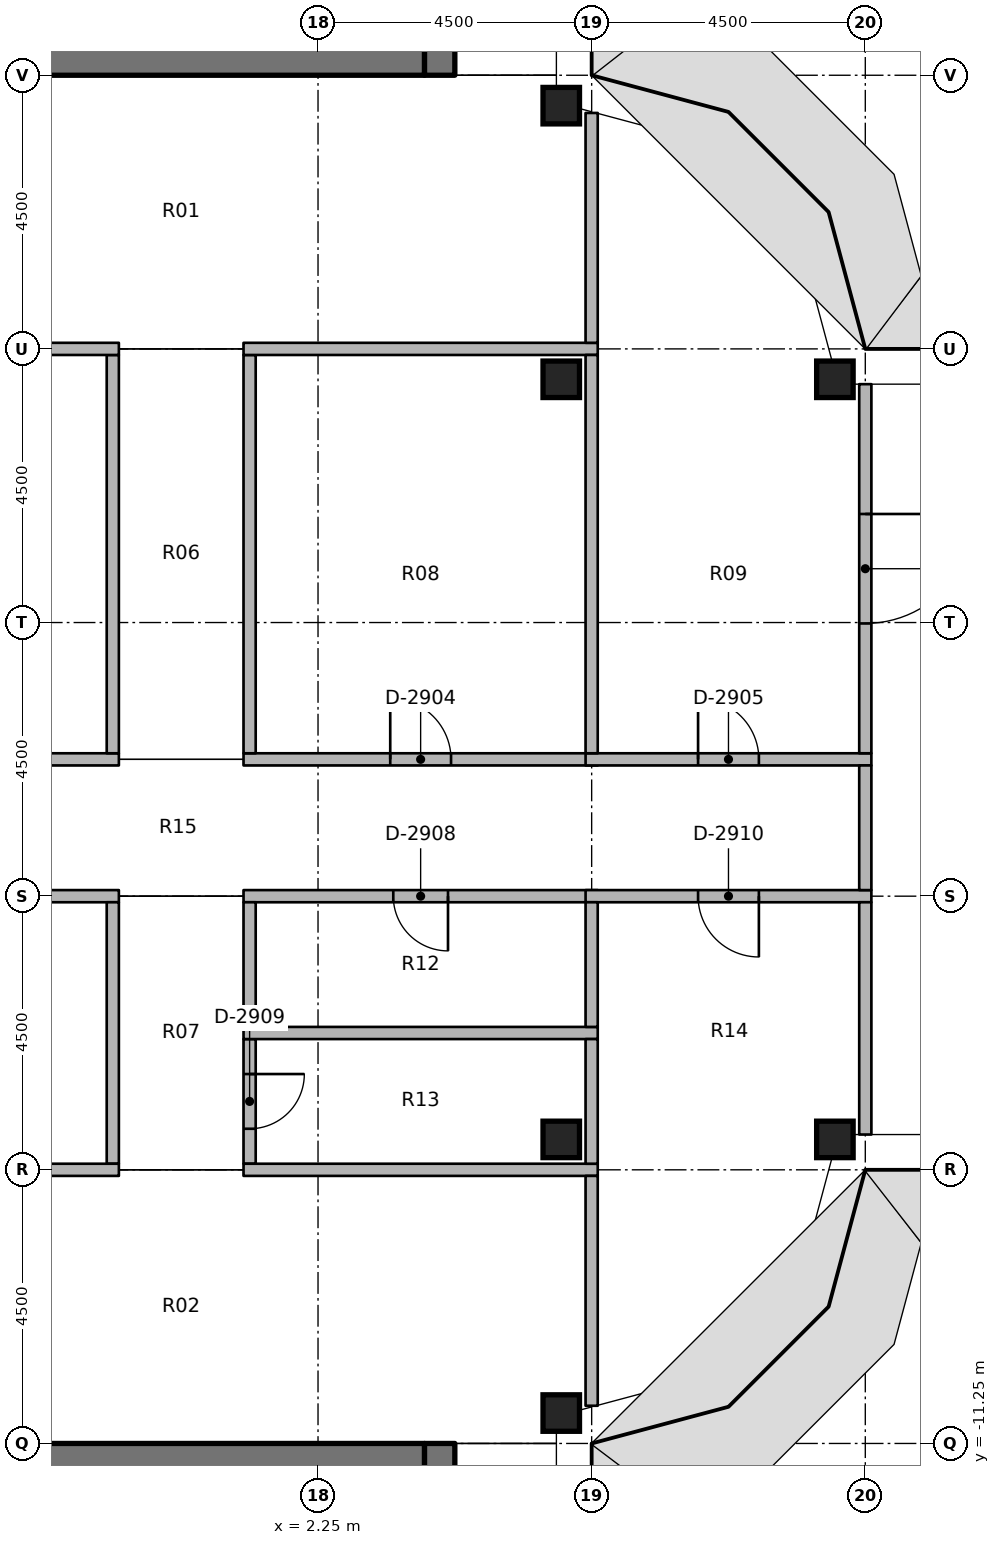
"""IFC4 building model, lengths in metres.
Left out: names, types, materials, properties, quantities, classifications, styles, units other than length and angle.
Written with IfcOpenShell. Run it as: python <this file> out.ifc"""

import sys

from ifc_helpers import new_model, si_unit, direction, frame, frame_2d, origin, origin_2d, place, context, subcontext, project, spatial, rectangle, extrude, element, fill, save


model = new_model("IFC4")
c1 = context("Model", 3, precision=1e-05, world=origin(), true_north=direction((0.0, 1.0)))
c2 = subcontext(c1, "Body", "Model", "MODEL_VIEW")
j1 = project(units=[si_unit("LENGTHUNIT", "METRE"), si_unit("PLANEANGLEUNIT", "RADIAN")], contexts=[c1])
p1 = place(None, origin())
s1 = spatial("IfcSite", under=j1, at=p1, CompositionType="ELEMENT")
p2 = place(p1, origin())
s2 = spatial("IfcBuilding", under=s1, at=p2, CompositionType="ELEMENT")
p3 = place(p2, frame((0.0, 0.0, 276.4)))
s3 = spatial("IfcBuildingStorey", under=s2, at=p3, CompositionType="ELEMENT", Elevation=276.4)
for number, where, z_axis, x_axis in (
    (1, (6.25, -10.75, 0.0), (0.0, 0.0, 1.0), (1.0, 0.0, 0.0)),
    (2, (6.25, -6.25, 0.0), (0.0, 0.0, 1.0), (1.0, 0.0, 0.0)),
    (3, (6.25, 6.25, 0.0), (0.0, 0.0, 1.0), (1.0, 0.0, 0.0)),
    (4, (6.25, 10.75, 0.0), (0.0, 0.0, 1.0), (1.0, 0.0, 0.0)),
    (5, (10.75, -6.25, 0.0), (0.0, 0.0, 1.0), (1.0, 0.0, 0.0)),
    (6, (10.75, 6.25, 0.0), (0.0, 0.0, 1.0), (1.0, 0.0, 0.0)),
):
    element("IfcColumn", number, at=place(p3, frame(where, z_axis=z_axis, x_axis=x_axis)), inside=s3, PredefinedType="COLUMN", context=c2, shape_type="SweptSolid", body=[
        extrude(rectangle(XDim=0.6, YDim=0.6, at=origin_2d()), origin(), (0.0, 0.0, 1.0), 3.65),
    ])
p4 = place(p3, frame((4.25, 11.25, 0.0), z_axis=(0.0, 0.0, 1.0), x_axis=(0.0, 1.0, 0.0)))
e7 = element("IfcWall", 7, at=p4, inside=s3, PredefinedType="SHEAR", context=c2, shape_type="SweptSolid", body=[
    extrude(rectangle(XDim=15.0, YDim=0.5, at=frame_2d((7.5, 0.0))), origin(), (0.0, 0.0, 1.0), 3.8),
])
p5 = place(p4, frame((7.15, 0.0, 0.0)))
e8 = element("IfcOpeningElement", 8, at=p5, cuts=e7, PredefinedType="OPENING", context=c2, shape_type="SweptSolid", body=[
    extrude(rectangle(XDim=1.5, YDim=2.3, at=frame_2d((0.75, 1.15))), frame((0.0, 0.26, 0.0), z_axis=(0.0, -1.0, 0.0), x_axis=(1.0, 0.0, 0.0)), (0.0, 0.0, 1.0), 0.52),
])
p6 = place(p4, frame((5.55, 0.0, 0.0)))
e9 = element("IfcOpeningElement", 9, at=p6, cuts=e7, PredefinedType="OPENING", context=c2, shape_type="SweptSolid", body=[
    extrude(rectangle(XDim=1.2, YDim=2.1, at=frame_2d((0.6, 1.05))), frame((0.0, 0.26, 0.0), z_axis=(0.0, -1.0, 0.0), x_axis=(1.0, 0.0, 0.0)), (0.0, 0.0, 1.0), 0.52),
])
p7 = place(p3, frame((-4.0, 11.5, 0.0), z_axis=(0.0, 0.0, 1.0), x_axis=(1.0, 0.0, 0.0)))
e10 = element("IfcWall", 10, at=p7, inside=s3, PredefinedType="SHEAR", context=c2, shape_type="SweptSolid", body=[
    extrude(rectangle(XDim=8.0, YDim=0.5, at=frame_2d((4.0, 0.0))), origin(), (0.0, 0.0, 1.0), 3.8),
])
p8 = place(p3, frame((4.25, -11.25, 0.0), z_axis=(0.0, 0.0, 1.0), x_axis=(0.0, -1.0, 0.0)))
e11 = element("IfcWall", 11, at=p8, inside=s3, PredefinedType="SHEAR", context=c2, shape_type="SweptSolid", body=[
    extrude(rectangle(XDim=15.0, YDim=0.5, at=frame_2d((7.5, 0.0))), origin(), (0.0, 0.0, 1.0), 3.8),
])
p9 = place(p8, frame((7.15, 0.0, 0.0)))
e12 = element("IfcOpeningElement", 12, at=p9, cuts=e11, PredefinedType="OPENING", context=c2, shape_type="SweptSolid", body=[
    extrude(rectangle(XDim=1.5, YDim=2.3, at=frame_2d((0.75, 1.15))), frame((0.0, 0.26, 0.0), z_axis=(0.0, -1.0, 0.0), x_axis=(1.0, 0.0, 0.0)), (0.0, 0.0, 1.0), 0.52),
])
p10 = place(p8, frame((13.9, 0.0, 0.0)))
e13 = element("IfcOpeningElement", 13, at=p10, cuts=e11, PredefinedType="OPENING", context=c2, shape_type="SweptSolid", body=[
    extrude(rectangle(XDim=0.9, YDim=2.1, at=frame_2d((0.45, 1.05))), frame((0.0, 0.26, 0.0), z_axis=(0.0, -1.0, 0.0), x_axis=(1.0, 0.0, 0.0)), (0.0, 0.0, 1.0), 0.52),
])
p11 = place(p8, frame((1.15, 0.0, 0.0)))
e14 = element("IfcOpeningElement", 14, at=p11, cuts=e11, PredefinedType="OPENING", context=c2, shape_type="SweptSolid", body=[
    extrude(rectangle(XDim=1.2, YDim=2.1, at=frame_2d((0.6, 1.05))), frame((0.0, 0.26, 0.0), z_axis=(0.0, -1.0, 0.0), x_axis=(1.0, 0.0, 0.0)), (0.0, 0.0, 1.0), 0.52),
])
p12 = place(p3, frame((-4.0, -11.5, 0.0), z_axis=(0.0, 0.0, 1.0), x_axis=(1.0, 0.0, 0.0)))
e15 = element("IfcWall", 15, at=p12, inside=s3, PredefinedType="SHEAR", context=c2, shape_type="SweptSolid", body=[
    extrude(rectangle(XDim=8.0, YDim=0.5, at=frame_2d((4.0, 0.0))), origin(), (0.0, 0.0, 1.0), 3.8),
])
p13 = place(p3, frame((1.025, 0.0, 0.0), z_axis=(0.0, 0.0, 1.0), x_axis=(1.0, 0.0, 0.0)))
e16 = element("IfcWall", 16, at=p13, inside=s3, PredefinedType="PARTITIONING", context=c2, shape_type="SweptSolid", body=[
    extrude(rectangle(XDim=5.825, YDim=0.2, at=frame_2d((2.913, 0.0))), origin(), (0.0, 0.0, 1.0), 2.75),
])
p14 = place(p13, frame((2.413, 0.0, 0.0)))
e17 = element("IfcOpeningElement", 17, at=p14, cuts=e16, PredefinedType="OPENING", context=c2, shape_type="SweptSolid", body=[
    extrude(rectangle(XDim=1.0, YDim=2.1, at=frame_2d((0.5, 1.05))), frame((0.0, 0.11, 0.0), z_axis=(0.0, -1.0, 0.0), x_axis=(1.0, 0.0, 0.0)), (0.0, 0.0, 1.0), 0.22),
])
p15 = place(p3, frame((6.65, 0.0, 0.0), z_axis=(0.0, 0.0, 1.0), x_axis=(1.0, 0.0, 0.0)))
e18 = element("IfcWall", 18, at=p15, inside=s3, PredefinedType="PARTITIONING", context=c2, shape_type="SweptSolid", body=[
    extrude(rectangle(XDim=4.7, YDim=0.2, at=frame_2d((2.35, 0.0))), origin(), (0.0, 0.0, 1.0), 2.75),
])
p16 = place(p15, frame((1.85, 0.0, 0.0)))
e19 = element("IfcOpeningElement", 19, at=p16, cuts=e18, PredefinedType="OPENING", context=c2, shape_type="SweptSolid", body=[
    extrude(rectangle(XDim=1.0, YDim=2.1, at=frame_2d((0.5, 1.05))), frame((0.0, 0.11, 0.0), z_axis=(0.0, -1.0, 0.0), x_axis=(1.0, 0.0, 0.0)), (0.0, 0.0, 1.0), 0.22),
])
p17 = place(p3, frame((-6.85, 0.0, 0.0), z_axis=(0.0, 0.0, 1.0), x_axis=(1.0, 0.0, 0.0)))
e20 = element("IfcWall", 20, at=p17, inside=s3, PredefinedType="PARTITIONING", context=c2, shape_type="SweptSolid", body=[
    extrude(rectangle(XDim=5.825, YDim=0.2, at=frame_2d((2.913, 0.0))), origin(), (0.0, 0.0, 1.0), 2.75),
])
p18 = place(p17, frame((2.413, 0.0, 0.0)))
e21 = element("IfcOpeningElement", 21, at=p18, cuts=e20, PredefinedType="OPENING", context=c2, shape_type="SweptSolid", body=[
    extrude(rectangle(XDim=1.0, YDim=2.1, at=frame_2d((0.5, 1.05))), frame((0.0, 0.11, 0.0), z_axis=(0.0, -1.0, 0.0), x_axis=(1.0, 0.0, 0.0)), (0.0, 0.0, 1.0), 0.22),
])
p19 = place(p3, frame((6.85, -2.25, 0.0), z_axis=(0.0, 0.0, 1.0), x_axis=(-1.0, 0.0, 0.0)))
e22 = element("IfcWall", 22, at=p19, inside=s3, PredefinedType="PARTITIONING", context=c2, shape_type="SweptSolid", body=[
    extrude(rectangle(XDim=5.825, YDim=0.2, at=frame_2d((2.913, 0.0))), origin(), (0.0, 0.0, 1.0), 2.75),
])
p20 = place(p19, frame((2.462, 0.0, 0.0)))
e23 = element("IfcOpeningElement", 23, at=p20, cuts=e22, PredefinedType="OPENING", context=c2, shape_type="SweptSolid", body=[
    extrude(rectangle(XDim=0.9, YDim=2.1, at=frame_2d((0.45, 1.05))), frame((0.0, 0.11, 0.0), z_axis=(0.0, -1.0, 0.0), x_axis=(1.0, 0.0, 0.0)), (0.0, 0.0, 1.0), 0.22),
])
p21 = place(p3, frame((11.35, -2.25, 0.0), z_axis=(0.0, 0.0, 1.0), x_axis=(-1.0, 0.0, 0.0)))
e24 = element("IfcWall", 24, at=p21, inside=s3, PredefinedType="PARTITIONING", context=c2, shape_type="SweptSolid", body=[
    extrude(rectangle(XDim=4.7, YDim=0.2, at=frame_2d((2.35, 0.0))), origin(), (0.0, 0.0, 1.0), 2.75),
])
p22 = place(p21, frame((1.85, 0.0, 0.0)))
e25 = element("IfcOpeningElement", 25, at=p22, cuts=e24, PredefinedType="OPENING", context=c2, shape_type="SweptSolid", body=[
    extrude(rectangle(XDim=1.0, YDim=2.1, at=frame_2d((0.5, 1.05))), frame((0.0, 0.11, 0.0), z_axis=(0.0, -1.0, 0.0), x_axis=(1.0, 0.0, 0.0)), (0.0, 0.0, 1.0), 0.22),
])
p23 = place(p3, frame((-1.025, -2.25, 0.0), z_axis=(0.0, 0.0, 1.0), x_axis=(-1.0, 0.0, 0.0)))
e26 = element("IfcWall", 26, at=p23, inside=s3, PredefinedType="PARTITIONING", context=c2, shape_type="SweptSolid", body=[
    extrude(rectangle(XDim=5.825, YDim=0.2, at=frame_2d((2.913, 0.0))), origin(), (0.0, 0.0, 1.0), 2.75),
])
p24 = place(p23, frame((2.413, 0.0, 0.0)))
e27 = element("IfcOpeningElement", 27, at=p24, cuts=e26, PredefinedType="OPENING", context=c2, shape_type="SweptSolid", body=[
    extrude(rectangle(XDim=1.0, YDim=2.1, at=frame_2d((0.5, 1.05))), frame((0.0, 0.11, 0.0), z_axis=(0.0, -1.0, 0.0), x_axis=(1.0, 0.0, 0.0)), (0.0, 0.0, 1.0), 0.22),
])
p25 = place(p3, frame((11.25, -2.15, 0.0), z_axis=(0.0, 0.0, 1.0), x_axis=(0.0, 1.0, 0.0)))
e28 = element("IfcWall", 28, at=p25, inside=s3, PredefinedType="PARTITIONING", context=c2, shape_type="SweptSolid", body=[
    extrude(rectangle(XDim=2.05, YDim=0.2, at=frame_2d((1.025, 0.0))), origin(), (0.0, 0.0, 1.0), 2.75),
])
for number, where, z_axis, x_axis in (
    (29, (1.125, 0.1, 0.0), (0.0, 0.0, 1.0), (0.0, 1.0, 0.0)),
    (30, (-1.125, 0.1, 0.0), (0.0, 0.0, 1.0), (0.0, 1.0, 0.0)),
):
    element("IfcWall", number, at=place(p3, frame(where, z_axis=z_axis, x_axis=x_axis)), inside=s3, PredefinedType="PARTITIONING", context=c2, shape_type="SweptSolid", body=[
        extrude(rectangle(XDim=6.55, YDim=0.2, at=frame_2d((3.275, 0.0))), origin(), (0.0, 0.0, 1.0), 2.75),
    ])
p26 = place(p3, frame((1.125, -4.4, 0.0), z_axis=(0.0, 0.0, 1.0), x_axis=(0.0, 1.0, 0.0)))
e31 = element("IfcWall", 31, at=p26, inside=s3, PredefinedType="PARTITIONING", context=c2, shape_type="SweptSolid", body=[
    extrude(rectangle(XDim=2.05, YDim=0.2, at=frame_2d((1.025, 0.0))), origin(), (0.0, 0.0, 1.0), 2.75),
])
p27 = place(p3, frame((1.125, -4.6, 0.0), z_axis=(0.0, 0.0, 1.0), x_axis=(0.0, -1.0, 0.0)))
e32 = element("IfcWall", 32, at=p27, inside=s3, PredefinedType="PARTITIONING", context=c2, shape_type="SweptSolid", body=[
    extrude(rectangle(XDim=2.05, YDim=0.2, at=frame_2d((1.025, 0.0))), origin(), (0.0, 0.0, 1.0), 2.75),
])
p28 = place(p27, frame((0.575, 0.0, 0.0)))
e33 = element("IfcOpeningElement", 33, at=p28, cuts=e32, PredefinedType="OPENING", context=c2, shape_type="SweptSolid", body=[
    extrude(rectangle(XDim=0.9, YDim=2.1, at=frame_2d((0.45, 1.05))), frame((0.0, 0.11, 0.0), z_axis=(0.0, -1.0, 0.0), x_axis=(1.0, 0.0, 0.0)), (0.0, 0.0, 1.0), 0.22),
])
p29 = place(p3, frame((-1.125, -6.65, 0.0), z_axis=(0.0, 0.0, 1.0), x_axis=(0.0, 1.0, 0.0)))
e34 = element("IfcWall", 34, at=p29, inside=s3, PredefinedType="PARTITIONING", context=c2, shape_type="SweptSolid", body=[
    extrude(rectangle(XDim=4.3, YDim=0.2, at=frame_2d((2.15, 0.0))), origin(), (0.0, 0.0, 1.0), 2.75),
])
p30 = place(p3, frame((1.025, 6.75, 0.0), z_axis=(0.0, 0.0, 1.0), x_axis=(1.0, 0.0, 0.0)))
e35 = element("IfcWall", 35, at=p30, inside=s3, PredefinedType="PARTITIONING", context=c2, shape_type="SweptSolid", body=[
    extrude(rectangle(XDim=5.825, YDim=0.2, at=frame_2d((2.913, 0.0))), origin(), (0.0, 0.0, 1.0), 2.75),
])
p31 = place(p3, frame((6.75, 6.85, 0.0), z_axis=(0.0, 0.0, 1.0), x_axis=(0.0, 1.0, 0.0)))
e36 = element("IfcWall", 36, at=p31, inside=s3, PredefinedType="PARTITIONING", context=c2, shape_type="SweptSolid", body=[
    extrude(rectangle(XDim=3.78, YDim=0.2, at=frame_2d((1.89, 0.0))), origin(), (0.0, 0.0, 1.0), 2.75),
])
for number, where, z_axis, x_axis in (
    (37, (-6.85, 6.75, 0.0), (0.0, 0.0, 1.0), (1.0, 0.0, 0.0)),
    (38, (1.025, -6.75, 0.0), (0.0, 0.0, 1.0), (1.0, 0.0, 0.0)),
):
    element("IfcWall", number, at=place(p3, frame(where, z_axis=z_axis, x_axis=x_axis)), inside=s3, PredefinedType="PARTITIONING", context=c2, shape_type="SweptSolid", body=[
        extrude(rectangle(XDim=5.825, YDim=0.2, at=frame_2d((2.913, 0.0))), origin(), (0.0, 0.0, 1.0), 2.75),
    ])
p32 = place(p3, frame((6.75, -10.63, 0.0), z_axis=(0.0, 0.0, 1.0), x_axis=(0.0, 1.0, 0.0)))
e39 = element("IfcWall", 39, at=p32, inside=s3, PredefinedType="PARTITIONING", context=c2, shape_type="SweptSolid", body=[
    extrude(rectangle(XDim=3.78, YDim=0.2, at=frame_2d((1.89, 0.0))), origin(), (0.0, 0.0, 1.0), 2.75),
])
p33 = place(p3, frame((-6.85, -6.75, 0.0), z_axis=(0.0, 0.0, 1.0), x_axis=(1.0, 0.0, 0.0)))
e40 = element("IfcWall", 40, at=p33, inside=s3, PredefinedType="PARTITIONING", context=c2, shape_type="SweptSolid", body=[
    extrude(rectangle(XDim=5.825, YDim=0.2, at=frame_2d((2.913, 0.0))), origin(), (0.0, 0.0, 1.0), 2.75),
])
p34 = place(p3, frame((6.75, 0.1, 0.0), z_axis=(0.0, 0.0, 1.0), x_axis=(0.0, 1.0, 0.0)))
e41 = element("IfcWall", 41, at=p34, inside=s3, PredefinedType="PARTITIONING", context=c2, shape_type="SweptSolid", body=[
    extrude(rectangle(XDim=6.55, YDim=0.2, at=frame_2d((3.275, 0.0))), origin(), (0.0, 0.0, 1.0), 2.75),
])
p35 = place(p3, frame((11.25, 6.17, 0.0), z_axis=(0.0, 0.0, 1.0), x_axis=(0.0, -1.0, 0.0)))
e42 = element("IfcWall", 42, at=p35, inside=s3, PredefinedType="PARTITIONING", context=c2, shape_type="SweptSolid", body=[
    extrude(rectangle(XDim=6.07, YDim=0.2, at=frame_2d((3.035, 0.0))), origin(), (0.0, 0.0, 1.0), 2.75),
])
p36 = place(p35, frame((2.135, 0.0, 0.0)))
e43 = element("IfcOpeningElement", 43, at=p36, cuts=e42, PredefinedType="OPENING", context=c2, shape_type="SweptSolid", body=[
    extrude(rectangle(XDim=1.8, YDim=2.1, at=frame_2d((0.9, 1.05))), frame((0.0, 0.11, 0.0), z_axis=(0.0, -1.0, 0.0), x_axis=(1.0, 0.0, 0.0)), (0.0, 0.0, 1.0), 0.22),
])
p37 = place(p3, frame((1.025, -4.5, 0.0), z_axis=(0.0, 0.0, 1.0), x_axis=(1.0, 0.0, 0.0)))
e44 = element("IfcWall", 44, at=p37, inside=s3, PredefinedType="PARTITIONING", context=c2, shape_type="SweptSolid", body=[
    extrude(rectangle(XDim=5.825, YDim=0.2, at=frame_2d((2.913, 0.0))), origin(), (0.0, 0.0, 1.0), 2.75),
])
for number, where, z_axis, x_axis in (
    (45, (6.75, -4.4, 0.0), (0.0, 0.0, 1.0), (0.0, 1.0, 0.0)),
    (46, (6.75, -6.65, 0.0), (0.0, 0.0, 1.0), (0.0, 1.0, 0.0)),
):
    element("IfcWall", number, at=place(p3, frame(where, z_axis=z_axis, x_axis=x_axis)), inside=s3, PredefinedType="PARTITIONING", context=c2, shape_type="SweptSolid", body=[
        extrude(rectangle(XDim=2.05, YDim=0.2, at=frame_2d((1.025, 0.0))), origin(), (0.0, 0.0, 1.0), 2.75),
    ])
p38 = place(p3, frame((11.25, -6.17, 0.0), z_axis=(0.0, 0.0, 1.0), x_axis=(0.0, 1.0, 0.0)))
e47 = element("IfcWall", 47, at=p38, inside=s3, PredefinedType="PARTITIONING", context=c2, shape_type="SweptSolid", body=[
    extrude(rectangle(XDim=3.82, YDim=0.2, at=frame_2d((1.91, 0.0))), origin(), (0.0, 0.0, 1.0), 2.75),
])
p39 = place(p36, origin())
e48 = element("IfcDoor", 48, at=p39, inside=s3, OperationType="DOUBLE_DOOR_SINGLE_SWING", PredefinedType="DOOR", context=c2, shape_type="SweptSolid", body=[
    extrude(rectangle(XDim=1.8, YDim=2.1, at=frame_2d((0.9, 1.05))), frame((0.0, 0.025, 0.0), z_axis=(0.0, -1.0, 0.0), x_axis=(1.0, 0.0, 0.0)), (0.0, 0.0, 1.0), 0.05),
])
fill(e43, e48)
p40 = place(p14, origin())
e49 = element("IfcDoor", 49, at=p40, inside=s3, OperationType="SINGLE_SWING_RIGHT", PredefinedType="DOOR", context=c2, shape_type="SweptSolid", body=[
    extrude(rectangle(XDim=1.0, YDim=2.1, at=frame_2d((0.5, 1.05))), frame((0.0, 0.025, 0.0), z_axis=(0.0, -1.0, 0.0), x_axis=(1.0, 0.0, 0.0)), (0.0, 0.0, 1.0), 0.05),
])
fill(e17, e49)
p41 = place(p16, origin())
e50 = element("IfcDoor", 50, at=p41, inside=s3, OperationType="SINGLE_SWING_RIGHT", PredefinedType="DOOR", context=c2, shape_type="SweptSolid", body=[
    extrude(rectangle(XDim=1.0, YDim=2.1, at=frame_2d((0.5, 1.05))), frame((0.0, 0.025, 0.0), z_axis=(0.0, -1.0, 0.0), x_axis=(1.0, 0.0, 0.0)), (0.0, 0.0, 1.0), 0.05),
])
fill(e19, e50)
p42 = place(p20, origin())
e51 = element("IfcDoor", 51, at=p42, inside=s3, OperationType="SINGLE_SWING_RIGHT", PredefinedType="DOOR", context=c2, shape_type="SweptSolid", body=[
    extrude(rectangle(XDim=0.9, YDim=2.1, at=frame_2d((0.45, 1.05))), frame((0.0, 0.025, 0.0), z_axis=(0.0, -1.0, 0.0), x_axis=(1.0, 0.0, 0.0)), (0.0, 0.0, 1.0), 0.05),
])
fill(e23, e51)
p43 = place(p28, origin())
e52 = element("IfcDoor", 52, at=p43, inside=s3, OperationType="SINGLE_SWING_RIGHT", PredefinedType="DOOR", context=c2, shape_type="SweptSolid", body=[
    extrude(rectangle(XDim=0.9, YDim=2.1, at=frame_2d((0.45, 1.05))), frame((0.0, 0.025, 0.0), z_axis=(0.0, -1.0, 0.0), x_axis=(1.0, 0.0, 0.0)), (0.0, 0.0, 1.0), 0.05),
])
fill(e33, e52)
p44 = place(p22, origin())
e53 = element("IfcDoor", 53, at=p44, inside=s3, OperationType="SINGLE_SWING_RIGHT", PredefinedType="DOOR", context=c2, shape_type="SweptSolid", body=[
    extrude(rectangle(XDim=1.0, YDim=2.1, at=frame_2d((0.5, 1.05))), frame((0.0, 0.025, 0.0), z_axis=(0.0, -1.0, 0.0), x_axis=(1.0, 0.0, 0.0)), (0.0, 0.0, 1.0), 0.05),
])
fill(e25, e53)
save(model, sys.argv[1])
